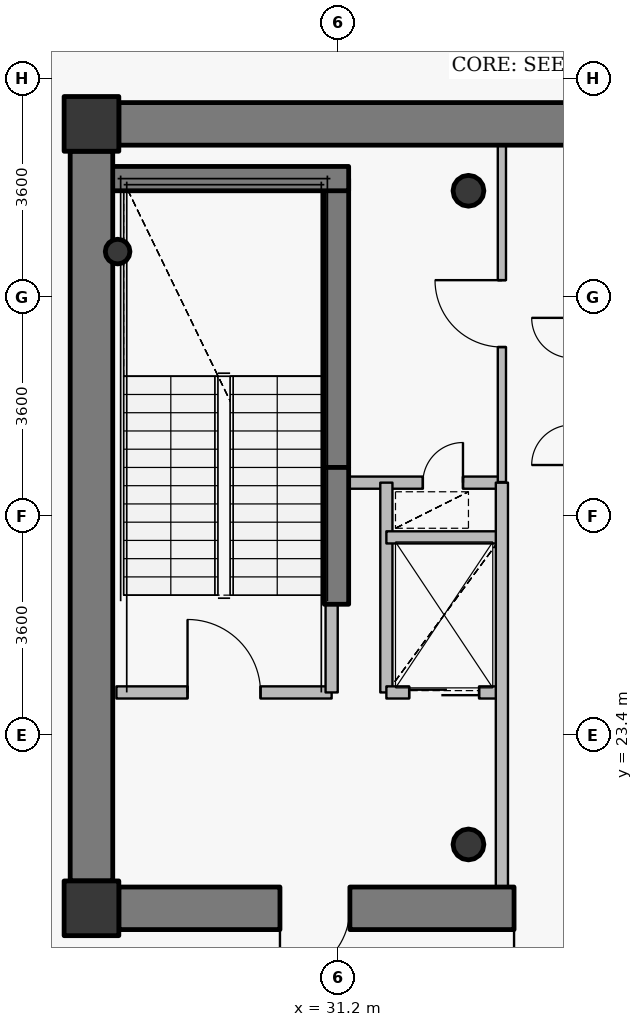
"""IFC4 building model, lengths in metres.
Left out: names, types, materials, properties, quantities, classifications, styles, units other than length and angle.
Written with IfcOpenShell. Run it as: python <this file> out.ifc"""

import sys

from ifc_helpers import new_model, si_unit, direction, frame, frame_2d, origin, origin_2d, place, context, subcontext, project, spatial, rectangle, hollow_circle, extrude, source, transform, mapped, element, fill, save


model = new_model("IFC4")
c1 = context("Model", 3, precision=1e-05, world=origin(), true_north=direction((0.0, 1.0)))
c2 = subcontext(c1, "Body", "Model", "MODEL_VIEW")
j1 = project(units=[si_unit("LENGTHUNIT", "METRE"), si_unit("PLANEANGLEUNIT", "RADIAN")], contexts=[c1])
p1 = place(None, origin())
s1 = spatial("IfcSite", under=j1, at=p1, CompositionType="ELEMENT")
p2 = place(p1, origin())
s2 = spatial("IfcBuilding", under=s1, at=p2, CompositionType="ELEMENT")
p3 = place(p2, frame((0.0, 0.0, 343.0)))
s3 = spatial("IfcBuildingStorey", under=s2, at=p3, CompositionType="ELEMENT", Elevation=343.0)
for number, where, z_axis, x_axis in (
    (1, (27.15, 20.55, 0.0), (0.0, 0.0, 1.0), (1.0, 0.0, 0.0)),
    (2, (27.15, 33.45, 0.0), (0.0, 0.0, 1.0), (1.0, 0.0, 0.0)),
):
    element("IfcColumn", number, at=place(p3, frame(where, z_axis=z_axis, x_axis=x_axis)), inside=s3, PredefinedType="COLUMN", context=c2, shape_type="SweptSolid", body=[
        extrude(rectangle(XDim=0.9, YDim=0.9, at=origin_2d()), origin(), (0.0, 0.0, 1.0), 3.8),
    ])
for number, where, z_axis, x_axis in (
    (3, (33.35, 21.6, 0.0), (0.0, 0.0, 1.0), (1.0, 0.0, 0.0)),
    (4, (33.35, 32.35, 0.0), (0.0, 0.0, 1.0), (1.0, 0.0, 0.0)),
):
    element("IfcColumn", number, at=place(p3, frame(where, z_axis=z_axis, x_axis=x_axis)), inside=s3, PredefinedType="COLUMN", context=c2, shape_type="SweptSolid", body=[
        extrude(hollow_circle(Radius=0.254, WallThickness=0.02, at=origin_2d()), origin(), (0.0, 0.0, 1.0), 3.8),
    ])
p4 = place(p3, frame((31.18, 27.8, 0.0), z_axis=(0.0, 0.0, 1.0), x_axis=(0.0, 1.0, 0.0)))
e5 = element("IfcWall", 5, at=p4, inside=s3, PredefinedType="SHEAR", context=c2, shape_type="SweptSolid", body=[
    extrude(rectangle(XDim=4.75, YDim=0.4, at=frame_2d((2.375, 0.0))), origin(), (0.0, 0.0, 1.0), 3.8),
])
p5 = place(p3, frame((27.25, 32.55, 0.0), z_axis=(0.0, 0.0, 1.0), x_axis=(1.0, 0.0, 0.0)))
e6 = element("IfcWall", 6, at=p5, inside=s3, PredefinedType="SHEAR", context=c2, shape_type="SweptSolid", body=[
    extrude(rectangle(XDim=4.13, YDim=0.4, at=frame_2d((2.065, 0.0))), origin(), (0.0, 0.0, 1.0), 3.8),
])
p6 = place(p3, frame((27.58, 31.35, 0.0), z_axis=(0.0, 0.0, 1.0), x_axis=(1.0, 0.0, 0.0)))
e7 = element("IfcColumn", 7, at=p6, inside=s3, PredefinedType="COLUMN", context=c2, shape_type="SweptSolid", body=[
    extrude(hollow_circle(Radius=0.203, WallThickness=0.016, at=origin_2d()), origin(), (0.0, 0.0, 1.0), 3.8),
])
p7 = place(p3, frame((27.6, 33.45, 0.0), z_axis=(0.0, 0.0, 1.0), x_axis=(1.0, 0.0, 0.0)))
e8 = element("IfcWall", 8, at=p7, inside=s3, PredefinedType="SHEAR", context=c2, shape_type="SweptSolid", body=[
    extrude(rectangle(XDim=16.8, YDim=0.7, at=frame_2d((8.4, 0.0))), origin(), (0.0, 0.0, 1.0), 3.05),
])
p8 = place(p7, frame((12.85, 0.0, 0.0)))
e9 = element("IfcOpeningElement", 9, at=p8, cuts=e8, PredefinedType="OPENING", context=c2, shape_type="SweptSolid", body=[
    extrude(rectangle(XDim=1.15, YDim=2.15, at=origin_2d()), frame((0.575, 0.36, 1.075), z_axis=(0.0, -1.0, 0.0), x_axis=(1.0, 0.0, 0.0)), (0.0, 0.0, 1.0), 0.72),
])
p9 = place(p3, frame((44.4, 20.55, 0.0), z_axis=(0.0, 0.0, 1.0), x_axis=(-1.0, 0.0, 0.0)))
e10 = element("IfcWall", 10, at=p9, inside=s3, PredefinedType="SHEAR", context=c2, shape_type="SweptSolid", body=[
    extrude(rectangle(XDim=16.8, YDim=0.7, at=frame_2d((8.4, 0.0))), origin(), (0.0, 0.0, 1.0), 3.05),
])
p10 = place(p9, frame((13.0, 0.0, 0.0)))
e11 = element("IfcOpeningElement", 11, at=p10, cuts=e10, PredefinedType="OPENING", context=c2, shape_type="SweptSolid", body=[
    extrude(rectangle(XDim=1.15, YDim=2.15, at=origin_2d()), frame((0.575, 0.36, 1.075), z_axis=(0.0, -1.0, 0.0), x_axis=(1.0, 0.0, 0.0)), (0.0, 0.0, 1.0), 0.72),
])
p11 = place(p9, frame((9.15, 0.0, 0.0)))
e12 = element("IfcOpeningElement", 12, at=p11, cuts=e10, PredefinedType="OPENING", context=c2, shape_type="SweptSolid", body=[
    extrude(rectangle(XDim=1.15, YDim=2.15, at=origin_2d()), frame((0.575, 0.36, 1.075), z_axis=(0.0, -1.0, 0.0), x_axis=(1.0, 0.0, 0.0)), (0.0, 0.0, 1.0), 0.72),
])
p12 = place(p3, frame((27.15, 21.0, 0.0), z_axis=(0.0, 0.0, 1.0), x_axis=(0.0, 1.0, 0.0)))
e13 = element("IfcWall", 13, at=p12, inside=s3, PredefinedType="SHEAR", context=c2, shape_type="SweptSolid", body=[
    extrude(rectangle(XDim=12.0, YDim=0.7, at=frame_2d((6.0, 0.0))), origin(), (0.0, 0.0, 1.0), 3.05),
])
p13 = place(p3, frame((31.18, 25.55, 0.0), z_axis=(0.0, 0.0, 1.0), x_axis=(0.0, 1.0, 0.0)))
e14 = element("IfcWall", 14, at=p13, inside=s3, PredefinedType="SHEAR", context=c2, shape_type="SweptSolid", body=[
    extrude(rectangle(XDim=2.25, YDim=0.4, at=frame_2d((1.125, 0.0))), origin(), (0.0, 0.0, 1.0), 3.1),
])
p14 = place(p3, frame((27.56, 24.1, 0.0), z_axis=(0.0, 0.0, 1.0), x_axis=(1.0, 0.0, 0.0)))
e15 = element("IfcWall", 15, at=p14, inside=s3, PredefinedType="PARTITIONING", context=c2, shape_type="SweptSolid", body=[
    extrude(rectangle(XDim=3.54, YDim=0.2, at=frame_2d((1.77, 0.0))), origin(), (0.0, 0.0, 1.0), 3.5),
])
p15 = place(p14, frame((1.17, 0.0, 0.0)))
e16 = element("IfcOpeningElement", 16, at=p15, cuts=e15, PredefinedType="OPENING", context=c2, shape_type="SweptSolid", body=[
    extrude(rectangle(XDim=1.2, YDim=2.15, at=origin_2d()), frame((0.6, 0.11, 1.075), z_axis=(0.0, -1.0, 0.0), x_axis=(1.0, 0.0, 0.0)), (0.0, 0.0, 1.0), 0.22),
])
p16 = place(p3, frame((31.1, 24.1, 0.0), z_axis=(0.0, 0.0, 1.0), x_axis=(0.0, 1.0, 0.0)))
e17 = element("IfcWall", 17, at=p16, inside=s3, PredefinedType="PARTITIONING", context=c2, shape_type="SweptSolid", body=[
    extrude(rectangle(XDim=1.44, YDim=0.2, at=frame_2d((0.72, 0.0))), origin(), (0.0, 0.0, 1.0), 3.5),
])
p17 = place(p3, frame((31.1, 27.55, 0.0), z_axis=(0.0, 0.0, 1.0), x_axis=(1.0, 0.0, 0.0)))
e18 = element("IfcWall", 18, at=p17, inside=s3, PredefinedType="PARTITIONING", context=c2, shape_type="SweptSolid", body=[
    extrude(rectangle(XDim=2.8, YDim=0.2, at=frame_2d((1.4, 0.0))), origin(), (0.0, 0.0, 1.0), 3.085),
])
p18 = place(p17, frame((1.5, 0.0, 0.0)))
e19 = element("IfcOpeningElement", 19, at=p18, cuts=e18, PredefinedType="OPENING", context=c2, shape_type="SweptSolid", body=[
    extrude(rectangle(XDim=0.66, YDim=2.05, at=origin_2d()), frame((0.33, 0.11, 1.025), z_axis=(0.0, -1.0, 0.0), x_axis=(1.0, 0.0, 0.0)), (0.0, 0.0, 1.0), 0.22),
])
p19 = place(p3, frame((32.0, 24.1, 0.0), z_axis=(0.0, 0.0, 1.0), x_axis=(0.0, 1.0, 0.0)))
e20 = element("IfcWall", 20, at=p19, inside=s3, PredefinedType="PARTITIONING", context=c2, shape_type="SweptSolid", body=[
    extrude(rectangle(XDim=3.45, YDim=0.2, at=frame_2d((1.725, 0.0))), origin(), (0.0, 0.0, 1.0), 3.5),
])
p20 = place(p3, frame((32.0, 24.1, 0.0), z_axis=(0.0, 0.0, 1.0), x_axis=(1.0, 0.0, 0.0)))
e21 = element("IfcWall", 21, at=p20, inside=s3, PredefinedType="PARTITIONING", context=c2, shape_type="SweptSolid", body=[
    extrude(rectangle(XDim=1.9, YDim=0.2, at=frame_2d((0.95, 0.0))), origin(), (0.0, 0.0, 1.0), 3.085),
])
p21 = place(p20, frame((0.375, 0.0, 0.0)))
e22 = element("IfcOpeningElement", 22, at=p21, cuts=e21, PredefinedType="OPENING", context=c2, shape_type="SweptSolid", body=[
    extrude(rectangle(XDim=1.15, YDim=2.15, at=origin_2d()), frame((0.575, 0.11, 1.075), z_axis=(0.0, -1.0, 0.0), x_axis=(1.0, 0.0, 0.0)), (0.0, 0.0, 1.0), 0.22),
])
p22 = place(p3, frame((32.0, 26.65, 0.0), z_axis=(0.0, 0.0, 1.0), x_axis=(1.0, 0.0, 0.0)))
e23 = element("IfcWall", 23, at=p22, inside=s3, PredefinedType="PARTITIONING", context=c2, shape_type="SweptSolid", body=[
    extrude(rectangle(XDim=1.9, YDim=0.2, at=frame_2d((0.95, 0.0))), origin(), (0.0, 0.0, 1.0), 3.085),
])
p23 = place(p3, frame((33.9, 20.9, 0.0), z_axis=(0.0, 0.0, 1.0), x_axis=(0.0, 1.0, 0.0)))
e24 = element("IfcWall", 24, at=p23, inside=s3, PredefinedType="PARTITIONING", context=c2, shape_type="SweptSolid", body=[
    extrude(rectangle(XDim=6.65, YDim=0.2, at=frame_2d((3.325, 0.0))), origin(), (0.0, 0.0, 1.0), 3.085),
])
p24 = place(p3, frame((33.9, 27.56, 0.0), z_axis=(0.0, 0.0, 1.0), x_axis=(0.0, 1.0, 0.0)))
e25 = element("IfcWall", 25, at=p24, inside=s3, PredefinedType="PARTITIONING", context=c2, shape_type="SweptSolid", body=[
    extrude(rectangle(XDim=5.54, YDim=0.135, at=frame_2d((2.77, 0.0))), origin(), (0.0, 0.0, 1.0), 3.085),
])
p25 = place(p24, frame((2.22, 0.0, 0.0)))
e26 = element("IfcOpeningElement", 26, at=p25, cuts=e25, PredefinedType="OPENING", context=c2, shape_type="SweptSolid", body=[
    extrude(rectangle(XDim=1.1, YDim=2.15, at=origin_2d()), frame((0.55, 0.078, 1.075), z_axis=(0.0, -1.0, 0.0), x_axis=(1.0, 0.0, 0.0)), (0.0, 0.0, 1.0), 0.155),
])
p26 = place(p3, frame((27.59, 33.8, 0.0), z_axis=(0.0, 0.0, 1.0), x_axis=(-1.0, 0.0, 0.0)))
e27 = element("IfcWall", 27, at=p26, inside=s3, PredefinedType="PARTITIONING", context=c2, shape_type="SweptSolid", body=[
    extrude(rectangle(XDim=0.79, YDim=0.135, at=frame_2d((0.395, 0.0))), origin(), (0.0, 0.0, 1.0), 2.285),
])
p27 = place(p3, frame((26.8, 33.492, 0.0), z_axis=(0.0, 0.0, 1.0), x_axis=(0.0, -1.0, 0.0)))
e28 = element("IfcWall", 28, at=p27, inside=s3, PredefinedType="PARTITIONING", context=c2, shape_type="SweptSolid", body=[
    extrude(rectangle(XDim=0.482, YDim=0.135, at=frame_2d((0.241, 0.0))), origin(), (0.0, 0.0, 1.0), 3.5),
])
p28 = place(p3, frame((26.8, 20.99, 0.0), z_axis=(0.0, 0.0, 1.0), x_axis=(0.0, -1.0, 0.0)))
e29 = element("IfcWall", 29, at=p28, inside=s3, PredefinedType="PARTITIONING", context=c2, shape_type="SweptSolid", body=[
    extrude(rectangle(XDim=0.79, YDim=0.135, at=frame_2d((0.395, 0.0))), origin(), (0.0, 0.0, 1.0), 2.285),
])
p29 = place(p3, frame((27.107, 20.2, 0.0), z_axis=(0.0, 0.0, 1.0), x_axis=(1.0, 0.0, 0.0)))
e30 = element("IfcWall", 30, at=p29, inside=s3, PredefinedType="PARTITIONING", context=c2, shape_type="SweptSolid", body=[
    extrude(rectangle(XDim=0.483, YDim=0.135, at=frame_2d((0.241, 0.0))), origin(), (0.0, 0.0, 1.0), 2.285),
])
m1 = source(origin(), c2, "Body", "SweptSolid", [
    extrude(rectangle(XDim=1.15, YDim=2.15, at=origin_2d()), frame((0.575, 0.025, 1.075), z_axis=(0.0, -1.0, 0.0), x_axis=(1.0, 0.0, 0.0)), (0.0, 0.0, 1.0), 0.05),
])
p30 = place(p10, origin())
e31 = element("IfcDoor", 31, at=p30, inside=s3, OperationType="SINGLE_SWING_RIGHT", PredefinedType="DOOR", context=c2, shape_type="MappedRepresentation", body=[
    mapped(m1, transform((0.0, 0.0, 0.0), x_axis=(1.0, 0.0, 0.0), y_axis=(0.0, 1.0, 0.0), z_axis=(0.0, 0.0, 1.0), scale=1.0)),
])
fill(e11, e31)
p31 = place(p11, origin())
e32 = element("IfcDoor", 32, at=p31, inside=s3, OperationType="SINGLE_SWING_RIGHT", PredefinedType="DOOR", context=c2, shape_type="MappedRepresentation", body=[
    mapped(m1, transform((0.0, 0.0, 0.0), x_axis=(1.0, 0.0, 0.0), y_axis=(0.0, 1.0, 0.0), z_axis=(0.0, 0.0, 1.0), scale=1.0)),
])
fill(e12, e32)
m2 = source(origin(), c2, "Body", "SweptSolid", [
    extrude(rectangle(XDim=1.2, YDim=2.15, at=origin_2d()), frame((0.6, 0.025, 1.075), z_axis=(0.0, -1.0, 0.0), x_axis=(1.0, 0.0, 0.0)), (0.0, 0.0, 1.0), 0.05),
])
p32 = place(p15, origin())
e33 = element("IfcDoor", 33, at=p32, inside=s3, OperationType="SINGLE_SWING_LEFT", PredefinedType="DOOR", context=c2, shape_type="MappedRepresentation", body=[
    mapped(m2, transform((0.0, 0.0, 0.0), x_axis=(1.0, 0.0, 0.0), y_axis=(0.0, 1.0, 0.0), z_axis=(0.0, 0.0, 1.0), scale=1.0)),
])
fill(e16, e33)
m3 = source(origin(), c2, "Body", "SweptSolid", [
    extrude(rectangle(XDim=1.15, YDim=2.15, at=origin_2d()), frame((0.575, 0.025, 1.075), z_axis=(0.0, -1.0, 0.0), x_axis=(1.0, 0.0, 0.0)), (0.0, 0.0, 1.0), 0.05),
])
p33 = place(p21, origin())
e34 = element("IfcDoor", 34, at=p33, inside=s3, OperationType="DOUBLE_DOOR_SLIDING", PredefinedType="USERDEFINED", context=c2, shape_type="MappedRepresentation", body=[
    mapped(m3, transform((0.0, 0.0, 0.0), x_axis=(1.0, 0.0, 0.0), y_axis=(0.0, 1.0, 0.0), z_axis=(0.0, 0.0, 1.0), scale=1.0)),
])
fill(e22, e34)
m4 = source(origin(), c2, "Body", "SweptSolid", [
    extrude(rectangle(XDim=1.1, YDim=2.15, at=origin_2d()), frame((0.55, 0.025, 1.075), z_axis=(0.0, -1.0, 0.0), x_axis=(1.0, 0.0, 0.0)), (0.0, 0.0, 1.0), 0.05),
])
p34 = place(p25, origin())
e35 = element("IfcDoor", 35, at=p34, inside=s3, OperationType="SINGLE_SWING_RIGHT", PredefinedType="DOOR", context=c2, shape_type="MappedRepresentation", body=[
    mapped(m4, transform((0.0, 0.0, 0.0), x_axis=(1.0, 0.0, 0.0), y_axis=(0.0, 1.0, 0.0), z_axis=(0.0, 0.0, 1.0), scale=1.0)),
])
fill(e26, e35)
m5 = source(origin(), c2, "Body", "SweptSolid", [
    extrude(rectangle(XDim=0.66, YDim=2.05, at=origin_2d()), frame((0.33, 0.025, 1.025), z_axis=(0.0, -1.0, 0.0), x_axis=(1.0, 0.0, 0.0)), (0.0, 0.0, 1.0), 0.05),
])
p35 = place(p18, origin())
e36 = element("IfcDoor", 36, at=p35, inside=s3, OperationType="SINGLE_SWING_RIGHT", PredefinedType="USERDEFINED", context=c2, shape_type="MappedRepresentation", body=[
    mapped(m5, transform((0.0, 0.0, 0.0), x_axis=(1.0, 0.0, 0.0), y_axis=(0.0, 1.0, 0.0), z_axis=(0.0, 0.0, 1.0), scale=1.0)),
])
fill(e19, e36)
save(model, sys.argv[1])
